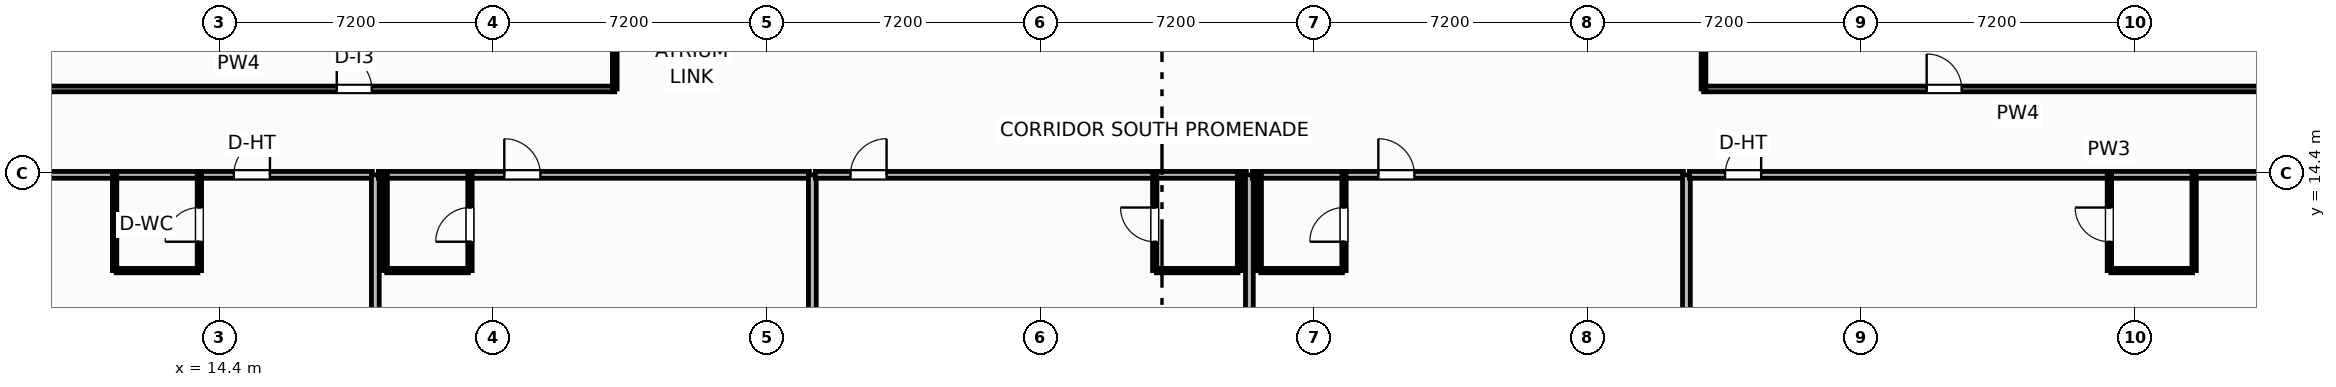
"""IFC4 building model, lengths in metres.
Left out: names, types, materials, properties, quantities, classifications, styles, units other than length and angle.
Written with IfcOpenShell. Run it as: python <this file> out.ifc"""

import sys

from ifc_helpers import new_model, si_unit, direction, frame, frame_2d, origin, place, context, subcontext, project, spatial, rectangle, extrude, element, fill, save


model = new_model("IFC4")
c1 = context("Model", 3, precision=1e-05, world=origin(), true_north=direction((0.0, 1.0)))
c2 = subcontext(c1, "Body", "Model", "MODEL_VIEW")
j1 = project(units=[si_unit("LENGTHUNIT", "METRE"), si_unit("PLANEANGLEUNIT", "RADIAN")], contexts=[c1])
p1 = place(None, origin())
s1 = spatial("IfcSite", under=j1, at=p1, CompositionType="ELEMENT")
p2 = place(p1, origin())
s2 = spatial("IfcBuilding", under=s1, at=p2, CompositionType="ELEMENT")
p3 = place(p2, frame((0.0, 0.0, 140.2)))
s3 = spatial("IfcBuildingStorey", under=s2, at=p3, CompositionType="ELEMENT", Elevation=140.2)
p4 = place(p3, frame((5.0, 16.61, 0.0), z_axis=(0.0, 0.0, 1.0), x_axis=(1.0, 0.0, 0.0)))
e1 = element("IfcWall", 1, at=p4, inside=s3, PredefinedType="PARTITIONING", context=c2, shape_type="SweptSolid", body=[
    extrude(rectangle(XDim=19.8, YDim=0.15, at=frame_2d((9.9, 0.0))), origin(), (0.0, 0.0, 1.0), 3.45),
])
p5 = place(p4, frame((12.485, 0.0, 0.0)))
e2 = element("IfcOpeningElement", 2, at=p5, cuts=e1, PredefinedType="OPENING", context=c2, shape_type="SweptSolid", body=[
    extrude(rectangle(XDim=0.92, YDim=2.05, at=frame_2d((0.46, 1.025))), frame((0.0, 0.085, 0.0), z_axis=(0.0, -1.0, 0.0), x_axis=(1.0, 0.0, 0.0)), (0.0, 0.0, 1.0), 0.17),
])
p6 = place(p3, frame((24.8, 16.61, 0.0), z_axis=(0.0, 0.0, 1.0), x_axis=(0.0, 1.0, 0.0)))
e3 = element("IfcWall", 3, at=p6, inside=s3, PredefinedType="PARTITIONING", context=c2, shape_type="SweptSolid", body=[
    extrude(rectangle(XDim=2.63, YDim=0.125, at=frame_2d((1.315, 0.0))), origin(), (0.0, 0.0, 1.0), 2.662),
])
p7 = place(p3, frame((53.45, 16.61, 0.0), z_axis=(0.0, 0.0, 1.0), x_axis=(1.0, 0.0, 0.0)))
e4 = element("IfcWall", 4, at=p7, inside=s3, PredefinedType="PARTITIONING", context=c2, shape_type="SweptSolid", body=[
    extrude(rectangle(XDim=16.55, YDim=0.15, at=frame_2d((8.275, 0.0))), origin(), (0.0, 0.0, 1.0), 3.45),
])
p8 = place(p7, frame((5.873, 0.0, 0.0)))
e5 = element("IfcOpeningElement", 5, at=p8, cuts=e4, PredefinedType="OPENING", context=c2, shape_type="SweptSolid", body=[
    extrude(rectangle(XDim=0.92, YDim=2.05, at=frame_2d((0.46, 1.025))), frame((0.0, 0.085, 0.0), z_axis=(0.0, -1.0, 0.0), x_axis=(1.0, 0.0, 0.0)), (0.0, 0.0, 1.0), 0.17),
])
p9 = place(p3, frame((53.45, 16.61, 0.0), z_axis=(0.0, 0.0, 1.0), x_axis=(0.0, 1.0, 0.0)))
e6 = element("IfcWall", 6, at=p9, inside=s3, PredefinedType="PARTITIONING", context=c2, shape_type="SweptSolid", body=[
    extrude(rectangle(XDim=2.63, YDim=0.125, at=frame_2d((1.315, 0.0))), origin(), (0.0, 0.0, 1.0), 3.45),
])
p10 = place(p3, frame((0.581, 14.35, 0.0), z_axis=(0.0, 0.0, 1.0), x_axis=(1.0, 0.0, 0.0)))
e7 = element("IfcWall", 7, at=p10, inside=s3, PredefinedType="PARTITIONING", context=c2, shape_type="SweptSolid", body=[
    extrude(rectangle(XDim=17.839, YDim=0.18, at=frame_2d((8.919, 0.0))), origin(), (0.0, 0.0, 1.0), 3.45),
])
p11 = place(p10, frame((14.196, 0.0, 0.0)))
e8 = element("IfcOpeningElement", 8, at=p11, cuts=e7, PredefinedType="OPENING", context=c2, shape_type="SweptSolid", body=[
    extrude(rectangle(XDim=0.95, YDim=2.15, at=frame_2d((0.475, 1.075))), frame((0.0, 0.1, 0.0), z_axis=(0.0, -1.0, 0.0), x_axis=(1.0, 0.0, 0.0)), (0.0, 0.0, 1.0), 0.2),
])
p12 = place(p3, frame((11.68, 11.83, 0.0), z_axis=(0.0, 0.0, 1.0), x_axis=(1.0, 0.0, 0.0)))
e9 = element("IfcWall", 9, at=p12, inside=s3, PredefinedType="PARTITIONING", context=c2, shape_type="SweptSolid", body=[
    extrude(rectangle(XDim=2.15, YDim=0.115, at=frame_2d((1.075, 0.0))), origin(), (0.0, 0.0, 1.0), 3.45),
])
p13 = place(p3, frame((13.87, 11.83, 0.0), z_axis=(0.0, 0.0, 1.0), x_axis=(0.0, 1.0, 0.0)))
e10 = element("IfcWall", 10, at=p13, inside=s3, PredefinedType="PARTITIONING", context=c2, shape_type="SweptSolid", body=[
    extrude(rectangle(XDim=2.52, YDim=0.115, at=frame_2d((1.26, 0.0))), origin(), (0.0, 0.0, 1.0), 3.45),
])
p14 = place(p13, frame((0.76, 0.0, 0.0)))
e11 = element("IfcOpeningElement", 11, at=p14, cuts=e10, PredefinedType="OPENING", context=c2, shape_type="SweptSolid", body=[
    extrude(rectangle(XDim=0.9, YDim=2.05, at=frame_2d((0.45, 1.025))), frame((0.0, 0.067, 0.0), z_axis=(0.0, -1.0, 0.0), x_axis=(1.0, 0.0, 0.0)), (0.0, 0.0, 1.0), 0.135),
])
p15 = place(p3, frame((11.64, 11.83, 0.0), z_axis=(0.0, 0.0, 1.0), x_axis=(0.0, 1.0, 0.0)))
e12 = element("IfcWall", 12, at=p15, inside=s3, PredefinedType="PARTITIONING", context=c2, shape_type="SweptSolid", body=[
    extrude(rectangle(XDim=2.52, YDim=0.115, at=frame_2d((1.26, 0.0))), origin(), (0.0, 0.0, 1.0), 3.45),
])
p16 = place(p3, frame((18.5, 4.379, 0.0), z_axis=(0.0, 0.0, 1.0), x_axis=(0.0, 1.0, 0.0)))
e13 = element("IfcWall", 13, at=p16, inside=s3, PredefinedType="PARTITIONING", context=c2, shape_type="SweptSolid", body=[
    extrude(rectangle(XDim=9.971, YDim=0.205, at=frame_2d((4.985, 0.0))), origin(), (0.0, 0.0, 1.0), 3.45),
])
p17 = place(p3, frame((18.58, 14.35, 0.0), z_axis=(0.0, 0.0, 1.0), x_axis=(1.0, 0.0, 0.0)))
e14 = element("IfcWall", 14, at=p17, inside=s3, PredefinedType="PARTITIONING", context=c2, shape_type="SweptSolid", body=[
    extrude(rectangle(XDim=11.34, YDim=0.18, at=frame_2d((5.67, 0.0))), origin(), (0.0, 0.0, 1.0), 3.45),
])
p18 = place(p17, frame((3.313, 0.0, 0.0)))
e15 = element("IfcOpeningElement", 15, at=p18, cuts=e14, PredefinedType="OPENING", context=c2, shape_type="SweptSolid", body=[
    extrude(rectangle(XDim=0.95, YDim=2.15, at=frame_2d((0.475, 1.075))), frame((0.0, 0.1, 0.0), z_axis=(0.0, -1.0, 0.0), x_axis=(1.0, 0.0, 0.0)), (0.0, 0.0, 1.0), 0.2),
])
p19 = place(p3, frame((18.8, 11.83, 0.0), z_axis=(0.0, 0.0, 1.0), x_axis=(1.0, 0.0, 0.0)))
e16 = element("IfcWall", 16, at=p19, inside=s3, PredefinedType="PARTITIONING", context=c2, shape_type="SweptSolid", body=[
    extrude(rectangle(XDim=2.15, YDim=0.115, at=frame_2d((1.075, 0.0))), origin(), (0.0, 0.0, 1.0), 3.45),
])
p20 = place(p3, frame((20.99, 11.83, 0.0), z_axis=(0.0, 0.0, 1.0), x_axis=(0.0, 1.0, 0.0)))
e17 = element("IfcWall", 17, at=p20, inside=s3, PredefinedType="PARTITIONING", context=c2, shape_type="SweptSolid", body=[
    extrude(rectangle(XDim=2.52, YDim=0.115, at=frame_2d((1.26, 0.0))), origin(), (0.0, 0.0, 1.0), 3.45),
])
p21 = place(p20, frame((0.76, 0.0, 0.0)))
e18 = element("IfcOpeningElement", 18, at=p21, cuts=e17, PredefinedType="OPENING", context=c2, shape_type="SweptSolid", body=[
    extrude(rectangle(XDim=0.9, YDim=2.05, at=frame_2d((0.45, 1.025))), frame((0.0, 0.067, 0.0), z_axis=(0.0, -1.0, 0.0), x_axis=(1.0, 0.0, 0.0)), (0.0, 0.0, 1.0), 0.135),
])
p22 = place(p3, frame((18.76, 11.83, 0.0), z_axis=(0.0, 0.0, 1.0), x_axis=(0.0, 1.0, 0.0)))
e19 = element("IfcWall", 19, at=p22, inside=s3, PredefinedType="PARTITIONING", context=c2, shape_type="SweptSolid", body=[
    extrude(rectangle(XDim=2.52, YDim=0.115, at=frame_2d((1.26, 0.0))), origin(), (0.0, 0.0, 1.0), 3.45),
])
p23 = place(p3, frame((30.0, 5.1, 0.0), z_axis=(0.0, 0.0, 1.0), x_axis=(0.0, 1.0, 0.0)))
e20 = element("IfcWall", 20, at=p23, inside=s3, PredefinedType="PARTITIONING", context=c2, shape_type="SweptSolid", body=[
    extrude(rectangle(XDim=9.25, YDim=0.205, at=frame_2d((4.625, 0.0))), origin(), (0.0, 0.0, 1.0), 3.45),
])
p24 = place(p3, frame((30.08, 14.35, 0.0), z_axis=(0.0, 0.0, 1.0), x_axis=(1.0, 0.0, 0.0)))
e21 = element("IfcWall", 21, at=p24, inside=s3, PredefinedType="PARTITIONING", context=c2, shape_type="SweptSolid", body=[
    extrude(rectangle(XDim=11.34, YDim=0.18, at=frame_2d((5.67, 0.0))), origin(), (0.0, 0.0, 1.0), 3.45),
])
p25 = place(p24, frame((0.923, 0.0, 0.0)))
e22 = element("IfcOpeningElement", 22, at=p25, cuts=e21, PredefinedType="OPENING", context=c2, shape_type="SweptSolid", body=[
    extrude(rectangle(XDim=0.95, YDim=2.15, at=frame_2d((0.475, 1.075))), frame((0.0, 0.1, 0.0), z_axis=(0.0, -1.0, 0.0), x_axis=(1.0, 0.0, 0.0)), (0.0, 0.0, 1.0), 0.2),
])
p26 = place(p3, frame((39.05, 11.83, 0.0), z_axis=(0.0, 0.0, 1.0), x_axis=(1.0, 0.0, 0.0)))
e23 = element("IfcWall", 23, at=p26, inside=s3, PredefinedType="PARTITIONING", context=c2, shape_type="SweptSolid", body=[
    extrude(rectangle(XDim=2.15, YDim=0.115, at=frame_2d((1.075, 0.0))), origin(), (0.0, 0.0, 1.0), 3.45),
])
p27 = place(p3, frame((39.01, 11.83, 0.0), z_axis=(0.0, 0.0, 1.0), x_axis=(0.0, 1.0, 0.0)))
e24 = element("IfcWall", 24, at=p27, inside=s3, PredefinedType="PARTITIONING", context=c2, shape_type="SweptSolid", body=[
    extrude(rectangle(XDim=2.52, YDim=0.115, at=frame_2d((1.26, 0.0))), origin(), (0.0, 0.0, 1.0), 3.45),
])
p28 = place(p27, frame((0.76, 0.0, 0.0)))
e25 = element("IfcOpeningElement", 25, at=p28, cuts=e24, PredefinedType="OPENING", context=c2, shape_type="SweptSolid", body=[
    extrude(rectangle(XDim=0.9, YDim=2.05, at=frame_2d((0.45, 1.025))), frame((0.0, 0.067, 0.0), z_axis=(0.0, -1.0, 0.0), x_axis=(1.0, 0.0, 0.0)), (0.0, 0.0, 1.0), 0.135),
])
p29 = place(p3, frame((41.24, 11.83, 0.0), z_axis=(0.0, 0.0, 1.0), x_axis=(0.0, 1.0, 0.0)))
e26 = element("IfcWall", 26, at=p29, inside=s3, PredefinedType="PARTITIONING", context=c2, shape_type="SweptSolid", body=[
    extrude(rectangle(XDim=2.52, YDim=0.115, at=frame_2d((1.26, 0.0))), origin(), (0.0, 0.0, 1.0), 3.45),
])
p30 = place(p3, frame((41.5, 3.706, 0.0), z_axis=(0.0, 0.0, 1.0), x_axis=(0.0, 1.0, 0.0)))
e27 = element("IfcWall", 27, at=p30, inside=s3, PredefinedType="PARTITIONING", context=c2, shape_type="SweptSolid", body=[
    extrude(rectangle(XDim=10.644, YDim=0.205, at=frame_2d((5.322, 0.0))), origin(), (0.0, 0.0, 1.0), 3.45),
])
p31 = place(p3, frame((41.58, 14.35, 0.0), z_axis=(0.0, 0.0, 1.0), x_axis=(1.0, 0.0, 0.0)))
e28 = element("IfcWall", 28, at=p31, inside=s3, PredefinedType="PARTITIONING", context=c2, shape_type="SweptSolid", body=[
    extrude(rectangle(XDim=11.34, YDim=0.18, at=frame_2d((5.67, 0.0))), origin(), (0.0, 0.0, 1.0), 3.45),
])
p32 = place(p31, frame((3.313, 0.0, 0.0)))
e29 = element("IfcOpeningElement", 29, at=p32, cuts=e28, PredefinedType="OPENING", context=c2, shape_type="SweptSolid", body=[
    extrude(rectangle(XDim=0.95, YDim=2.15, at=frame_2d((0.475, 1.075))), frame((0.0, 0.1, 0.0), z_axis=(0.0, -1.0, 0.0), x_axis=(1.0, 0.0, 0.0)), (0.0, 0.0, 1.0), 0.2),
])
p33 = place(p3, frame((41.8, 11.83, 0.0), z_axis=(0.0, 0.0, 1.0), x_axis=(1.0, 0.0, 0.0)))
e30 = element("IfcWall", 30, at=p33, inside=s3, PredefinedType="PARTITIONING", context=c2, shape_type="SweptSolid", body=[
    extrude(rectangle(XDim=2.15, YDim=0.115, at=frame_2d((1.075, 0.0))), origin(), (0.0, 0.0, 1.0), 3.45),
])
p34 = place(p3, frame((43.99, 11.83, 0.0), z_axis=(0.0, 0.0, 1.0), x_axis=(0.0, 1.0, 0.0)))
e31 = element("IfcWall", 31, at=p34, inside=s3, PredefinedType="PARTITIONING", context=c2, shape_type="SweptSolid", body=[
    extrude(rectangle(XDim=2.52, YDim=0.115, at=frame_2d((1.26, 0.0))), origin(), (0.0, 0.0, 1.0), 3.45),
])
p35 = place(p34, frame((0.76, 0.0, 0.0)))
e32 = element("IfcOpeningElement", 32, at=p35, cuts=e31, PredefinedType="OPENING", context=c2, shape_type="SweptSolid", body=[
    extrude(rectangle(XDim=0.9, YDim=2.05, at=frame_2d((0.45, 1.025))), frame((0.0, 0.067, 0.0), z_axis=(0.0, -1.0, 0.0), x_axis=(1.0, 0.0, 0.0)), (0.0, 0.0, 1.0), 0.135),
])
p36 = place(p3, frame((41.76, 11.83, 0.0), z_axis=(0.0, 0.0, 1.0), x_axis=(0.0, 1.0, 0.0)))
e33 = element("IfcWall", 33, at=p36, inside=s3, PredefinedType="PARTITIONING", context=c2, shape_type="SweptSolid", body=[
    extrude(rectangle(XDim=2.52, YDim=0.115, at=frame_2d((1.26, 0.0))), origin(), (0.0, 0.0, 1.0), 3.45),
])
p37 = place(p3, frame((53.0, 0.197, 0.0), z_axis=(0.0, 0.0, 1.0), x_axis=(0.0, 1.0, 0.0)))
e34 = element("IfcWall", 34, at=p37, inside=s3, PredefinedType="PARTITIONING", context=c2, shape_type="SweptSolid", body=[
    extrude(rectangle(XDim=14.153, YDim=0.205, at=frame_2d((7.077, 0.0))), origin(), (0.0, 0.0, 1.0), 3.45),
])
p38 = place(p3, frame((53.08, 14.35, 0.0), z_axis=(0.0, 0.0, 1.0), x_axis=(1.0, 0.0, 0.0)))
e35 = element("IfcWall", 35, at=p38, inside=s3, PredefinedType="PARTITIONING", context=c2, shape_type="SweptSolid", body=[
    extrude(rectangle(XDim=22.084, YDim=0.18, at=frame_2d((11.042, 0.0))), origin(), (0.0, 0.0, 1.0), 3.45),
])
p39 = place(p38, frame((0.937, 0.0, 0.0)))
e36 = element("IfcOpeningElement", 36, at=p39, cuts=e35, PredefinedType="OPENING", context=c2, shape_type="SweptSolid", body=[
    extrude(rectangle(XDim=0.95, YDim=2.15, at=frame_2d((0.475, 1.075))), frame((0.0, 0.1, 0.0), z_axis=(0.0, -1.0, 0.0), x_axis=(1.0, 0.0, 0.0)), (0.0, 0.0, 1.0), 0.2),
])
p40 = place(p3, frame((64.17, 11.83, 0.0), z_axis=(0.0, 0.0, 1.0), x_axis=(1.0, 0.0, 0.0)))
e37 = element("IfcWall", 37, at=p40, inside=s3, PredefinedType="PARTITIONING", context=c2, shape_type="SweptSolid", body=[
    extrude(rectangle(XDim=2.15, YDim=0.115, at=frame_2d((1.075, 0.0))), origin(), (0.0, 0.0, 1.0), 3.45),
])
p41 = place(p3, frame((64.13, 11.83, 0.0), z_axis=(0.0, 0.0, 1.0), x_axis=(0.0, 1.0, 0.0)))
e38 = element("IfcWall", 38, at=p41, inside=s3, PredefinedType="PARTITIONING", context=c2, shape_type="SweptSolid", body=[
    extrude(rectangle(XDim=2.52, YDim=0.115, at=frame_2d((1.26, 0.0))), origin(), (0.0, 0.0, 1.0), 3.45),
])
p42 = place(p41, frame((0.76, 0.0, 0.0)))
e39 = element("IfcOpeningElement", 39, at=p42, cuts=e38, PredefinedType="OPENING", context=c2, shape_type="SweptSolid", body=[
    extrude(rectangle(XDim=0.9, YDim=2.05, at=frame_2d((0.45, 1.025))), frame((0.0, 0.067, 0.0), z_axis=(0.0, -1.0, 0.0), x_axis=(1.0, 0.0, 0.0)), (0.0, 0.0, 1.0), 0.135),
])
p43 = place(p3, frame((66.36, 11.83, 0.0), z_axis=(0.0, 0.0, 1.0), x_axis=(0.0, 1.0, 0.0)))
e40 = element("IfcWall", 40, at=p43, inside=s3, PredefinedType="PARTITIONING", context=c2, shape_type="SweptSolid", body=[
    extrude(rectangle(XDim=2.52, YDim=0.115, at=frame_2d((1.26, 0.0))), origin(), (0.0, 0.0, 1.0), 3.45),
])
p44 = place(p5, origin())
e41 = element("IfcDoor", 41, at=p44, inside=s3, OperationType="SINGLE_SWING_LEFT", PredefinedType="DOOR", context=c2, shape_type="SweptSolid", body=[
    extrude(rectangle(XDim=0.92, YDim=2.05, at=frame_2d((0.46, 1.025))), frame((0.0, 0.025, 0.0), z_axis=(0.0, -1.0, 0.0), x_axis=(1.0, 0.0, 0.0)), (0.0, 0.0, 1.0), 0.05),
])
fill(e2, e41)
p45 = place(p8, origin())
e42 = element("IfcDoor", 42, at=p45, inside=s3, OperationType="SINGLE_SWING_LEFT", PredefinedType="DOOR", context=c2, shape_type="SweptSolid", body=[
    extrude(rectangle(XDim=0.92, YDim=2.05, at=frame_2d((0.46, 1.025))), frame((0.0, 0.025, 0.0), z_axis=(0.0, -1.0, 0.0), x_axis=(1.0, 0.0, 0.0)), (0.0, 0.0, 1.0), 0.05),
])
fill(e5, e42)
p46 = place(p11, origin())
e43 = element("IfcDoor", 43, at=p46, inside=s3, OperationType="SINGLE_SWING_RIGHT", PredefinedType="DOOR", context=c2, shape_type="SweptSolid", body=[
    extrude(rectangle(XDim=0.95, YDim=2.15, at=frame_2d((0.475, 1.075))), frame((0.0, 0.025, 0.0), z_axis=(0.0, -1.0, 0.0), x_axis=(1.0, 0.0, 0.0)), (0.0, 0.0, 1.0), 0.05),
])
fill(e8, e43)
p47 = place(p14, origin())
e44 = element("IfcDoor", 44, at=p47, inside=s3, OperationType="SINGLE_SWING_LEFT", PredefinedType="DOOR", context=c2, shape_type="SweptSolid", body=[
    extrude(rectangle(XDim=0.9, YDim=2.05, at=frame_2d((0.45, 1.025))), frame((0.0, 0.025, 0.0), z_axis=(0.0, -1.0, 0.0), x_axis=(1.0, 0.0, 0.0)), (0.0, 0.0, 1.0), 0.05),
])
fill(e11, e44)
p48 = place(p18, origin())
e45 = element("IfcDoor", 45, at=p48, inside=s3, OperationType="SINGLE_SWING_LEFT", PredefinedType="DOOR", context=c2, shape_type="SweptSolid", body=[
    extrude(rectangle(XDim=0.95, YDim=2.15, at=frame_2d((0.475, 1.075))), frame((0.0, 0.025, 0.0), z_axis=(0.0, -1.0, 0.0), x_axis=(1.0, 0.0, 0.0)), (0.0, 0.0, 1.0), 0.05),
])
fill(e15, e45)
p49 = place(p21, origin())
e46 = element("IfcDoor", 46, at=p49, inside=s3, OperationType="SINGLE_SWING_LEFT", PredefinedType="DOOR", context=c2, shape_type="SweptSolid", body=[
    extrude(rectangle(XDim=0.9, YDim=2.05, at=frame_2d((0.45, 1.025))), frame((0.0, 0.025, 0.0), z_axis=(0.0, -1.0, 0.0), x_axis=(1.0, 0.0, 0.0)), (0.0, 0.0, 1.0), 0.05),
])
fill(e18, e46)
p50 = place(p25, origin())
e47 = element("IfcDoor", 47, at=p50, inside=s3, OperationType="SINGLE_SWING_RIGHT", PredefinedType="DOOR", context=c2, shape_type="SweptSolid", body=[
    extrude(rectangle(XDim=0.95, YDim=2.15, at=frame_2d((0.475, 1.075))), frame((0.0, 0.025, 0.0), z_axis=(0.0, -1.0, 0.0), x_axis=(1.0, 0.0, 0.0)), (0.0, 0.0, 1.0), 0.05),
])
fill(e22, e47)
p51 = place(p28, origin())
e48 = element("IfcDoor", 48, at=p51, inside=s3, OperationType="SINGLE_SWING_RIGHT", PredefinedType="DOOR", context=c2, shape_type="SweptSolid", body=[
    extrude(rectangle(XDim=0.9, YDim=2.05, at=frame_2d((0.45, 1.025))), frame((0.0, 0.025, 0.0), z_axis=(0.0, -1.0, 0.0), x_axis=(1.0, 0.0, 0.0)), (0.0, 0.0, 1.0), 0.05),
])
fill(e25, e48)
p52 = place(p32, origin())
e49 = element("IfcDoor", 49, at=p52, inside=s3, OperationType="SINGLE_SWING_LEFT", PredefinedType="DOOR", context=c2, shape_type="SweptSolid", body=[
    extrude(rectangle(XDim=0.95, YDim=2.15, at=frame_2d((0.475, 1.075))), frame((0.0, 0.025, 0.0), z_axis=(0.0, -1.0, 0.0), x_axis=(1.0, 0.0, 0.0)), (0.0, 0.0, 1.0), 0.05),
])
fill(e29, e49)
p53 = place(p35, origin())
e50 = element("IfcDoor", 50, at=p53, inside=s3, OperationType="SINGLE_SWING_LEFT", PredefinedType="DOOR", context=c2, shape_type="SweptSolid", body=[
    extrude(rectangle(XDim=0.9, YDim=2.05, at=frame_2d((0.45, 1.025))), frame((0.0, 0.025, 0.0), z_axis=(0.0, -1.0, 0.0), x_axis=(1.0, 0.0, 0.0)), (0.0, 0.0, 1.0), 0.05),
])
fill(e32, e50)
p54 = place(p39, origin())
e51 = element("IfcDoor", 51, at=p54, inside=s3, OperationType="SINGLE_SWING_RIGHT", PredefinedType="DOOR", context=c2, shape_type="SweptSolid", body=[
    extrude(rectangle(XDim=0.95, YDim=2.15, at=frame_2d((0.475, 1.075))), frame((0.0, 0.025, 0.0), z_axis=(0.0, -1.0, 0.0), x_axis=(1.0, 0.0, 0.0)), (0.0, 0.0, 1.0), 0.05),
])
fill(e36, e51)
p55 = place(p42, origin())
e52 = element("IfcDoor", 52, at=p55, inside=s3, OperationType="SINGLE_SWING_RIGHT", PredefinedType="DOOR", context=c2, shape_type="SweptSolid", body=[
    extrude(rectangle(XDim=0.9, YDim=2.05, at=frame_2d((0.45, 1.025))), frame((0.0, 0.025, 0.0), z_axis=(0.0, -1.0, 0.0), x_axis=(1.0, 0.0, 0.0)), (0.0, 0.0, 1.0), 0.05),
])
fill(e39, e52)
save(model, sys.argv[1])
